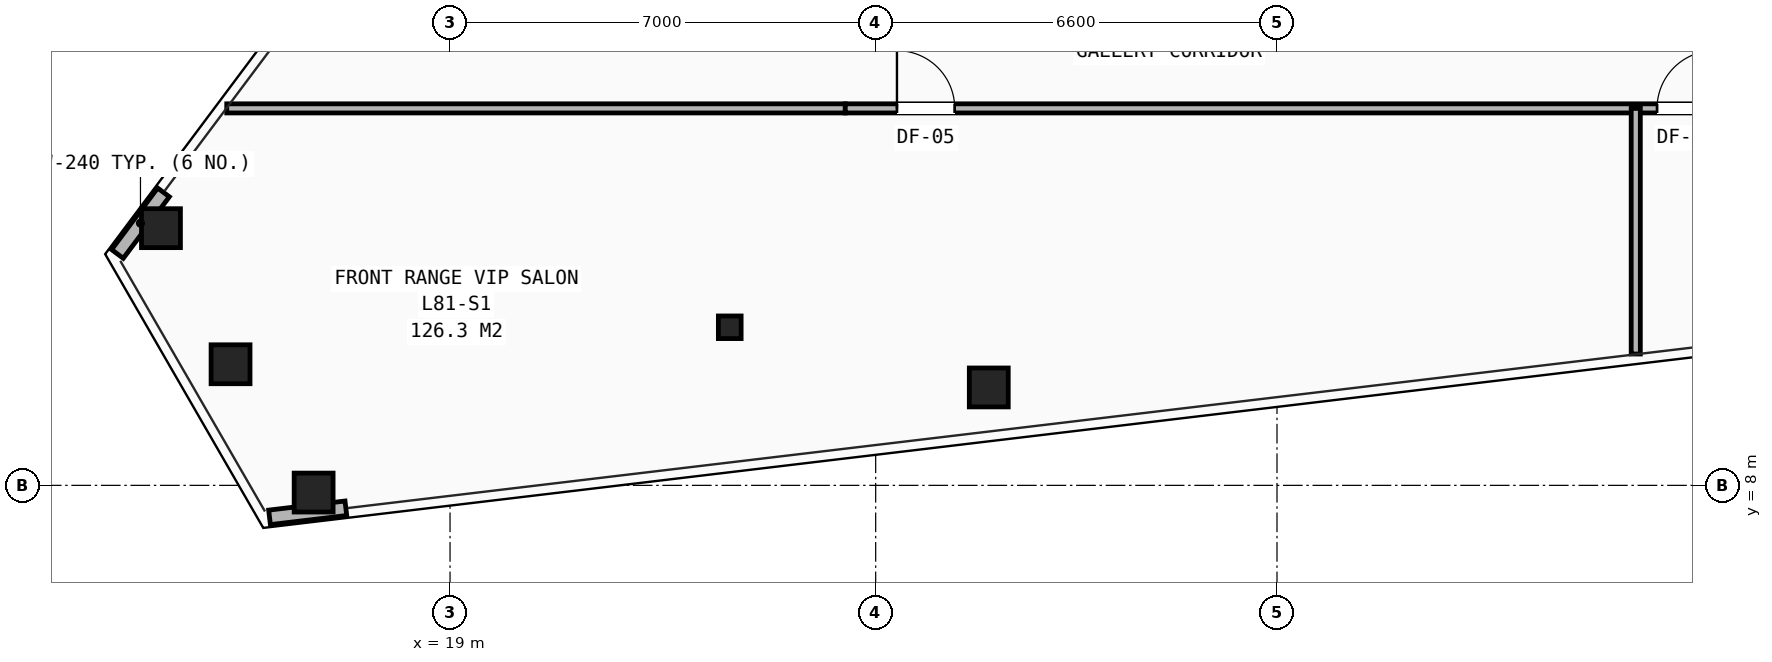
"""IFC4 building model, lengths in metres.
Left out: names, types, materials, properties, quantities, classifications, styles, units other than length and angle.
Written with IfcOpenShell. Run it as: python <this file> out.ifc"""

import sys

from ifc_helpers import new_model, si_unit, direction, frame, frame_2d, origin, origin_2d, place, context, subcontext, project, spatial, rectangle, hollow_rectangle, i_section, extrude, element, fill, save


model = new_model("IFC4")
c1 = context("Model", 3, precision=1e-05, world=origin(), true_north=direction((0.0, 1.0)))
c2 = subcontext(c1, "Body", "Model", "MODEL_VIEW")
j1 = project(units=[si_unit("LENGTHUNIT", "METRE"), si_unit("PLANEANGLEUNIT", "RADIAN")], contexts=[c1])
p1 = place(None, origin())
s1 = spatial("IfcSite", under=j1, at=p1, CompositionType="ELEMENT")
p2 = place(p1, origin())
s2 = spatial("IfcBuilding", under=s1, at=p2, CompositionType="ELEMENT")
p3 = place(p2, frame((0.0, 0.0, 286.5)))
s3 = spatial("IfcBuildingStorey", under=s2, at=p3, CompositionType="ELEMENT", Elevation=286.5)
p4 = place(p3, frame((23.6, 10.6, 0.0), z_axis=(0.0, 0.0, 1.0), x_axis=(1.0, 0.0, 0.0)))
e1 = element("IfcColumn", 1, at=p4, inside=s3, PredefinedType="COLUMN", context=c2, shape_type="SweptSolid", body=[
    extrude(i_section(OverallWidth=0.374, OverallDepth=0.372, WebThickness=0.016, FlangeThickness=0.026, at=origin_2d()), origin(), (0.0, 0.0, 1.0), 3.5),
])
for number, where, z_axis, x_axis in (
    (2, (14.246, 12.23, 0.0), (0.0, 0.0, 1.0), (1.0, 0.0, 0.0)),
    (3, (15.39, 9.992, 0.0), (0.0, 0.0, 1.0), (1.0, 0.0, 0.0)),
    (4, (16.757, 7.882, 0.0), (0.0, 0.0, 1.0), (1.0, 0.0, 0.0)),
    (5, (27.86, 9.61, 0.0), (0.0, 0.0, 1.0), (1.0, 0.0, 0.0)),
):
    element("IfcColumn", number, at=place(p3, frame(where, z_axis=z_axis, x_axis=x_axis)), inside=s3, PredefinedType="COLUMN", context=c2, shape_type="SweptSolid", body=[
        extrude(hollow_rectangle(XDim=0.64, YDim=0.64, WallThickness=0.045, at=origin_2d()), origin(), (0.0, 0.0, 1.0), 3.5),
    ])
p5 = place(p3, frame((14.288, 12.818, 0.0), z_axis=(0.0, 0.0, 1.0), x_axis=(-0.5991037677, -0.800671390477, 0.0)))
e6 = element("IfcWall", 6, at=p5, inside=s3, PredefinedType="SHEAR", context=c2, shape_type="SweptSolid", body=[
    extrude(rectangle(XDim=1.264, YDim=0.24, at=frame_2d((0.632, 0.0))), origin(), (0.0, 0.0, 1.0), 2.573),
])
p6 = place(p3, frame((16.031, 7.473, 0.0), z_axis=(0.0, 0.0, 1.0), x_axis=(0.992948828443, 0.118543764469, 0.0)))
e7 = element("IfcWall", 7, at=p6, inside=s3, PredefinedType="SHEAR", context=c2, shape_type="SweptSolid", body=[
    extrude(rectangle(XDim=1.265, YDim=0.24, at=frame_2d((0.632, 0.0))), origin(), (0.0, 0.0, 1.0), 2.573),
])
p7 = place(p3, frame((15.328, 14.2, 0.0), z_axis=(0.0, 0.0, 1.0), x_axis=(1.0, 0.0, 0.0)))
e8 = element("IfcWall", 8, at=p7, inside=s3, PredefinedType="PARTITIONING", context=c2, shape_type="SweptSolid", body=[
    extrude(rectangle(XDim=10.172, YDim=0.15, at=frame_2d((5.086, 0.0))), origin(), (0.0, 0.0, 1.0), 2.242),
])
p8 = place(p3, frame((25.5, 14.2, 0.0), z_axis=(0.0, 0.0, 1.0), x_axis=(1.0, 0.0, 0.0)))
e9 = element("IfcWall", 9, at=p8, inside=s3, PredefinedType="PARTITIONING", context=c2, shape_type="SweptSolid", body=[
    extrude(rectangle(XDim=29.0, YDim=0.15, at=frame_2d((14.5, 0.0))), origin(), (0.0, 0.0, 1.0), 2.242),
])
p9 = place(p8, frame((0.85, 0.0, 0.0)))
e10 = element("IfcOpeningElement", 10, at=p9, cuts=e9, PredefinedType="OPENING", context=c2, shape_type="SweptSolid", body=[
    extrude(rectangle(XDim=0.95, YDim=2.1, at=frame_2d((0.475, 1.05))), frame((0.0, 0.085, 0.0), z_axis=(0.0, -1.0, 0.0), x_axis=(1.0, 0.0, 0.0)), (0.0, 0.0, 1.0), 0.17),
])
p10 = place(p8, frame((13.35, 0.0, 0.0)))
e11 = element("IfcOpeningElement", 11, at=p10, cuts=e9, PredefinedType="OPENING", context=c2, shape_type="SweptSolid", body=[
    extrude(rectangle(XDim=0.95, YDim=2.1, at=frame_2d((0.475, 1.05))), frame((0.0, 0.085, 0.0), z_axis=(0.0, -1.0, 0.0), x_axis=(1.0, 0.0, 0.0)), (0.0, 0.0, 1.0), 0.17),
])
p11 = place(p3, frame((38.5, 10.16, 0.0), z_axis=(0.0, 0.0, 1.0), x_axis=(0.0, 1.0, 0.0)))
e12 = element("IfcWall", 12, at=p11, inside=s3, PredefinedType="PARTITIONING", context=c2, shape_type="SweptSolid", body=[
    extrude(rectangle(XDim=4.04, YDim=0.15, at=frame_2d((2.02, 0.0))), origin(), (0.0, 0.0, 1.0), 2.242),
])
p12 = place(p9, origin())
e13 = element("IfcDoor", 13, at=p12, inside=s3, OperationType="SINGLE_SWING_LEFT", PredefinedType="DOOR", context=c2, shape_type="SweptSolid", body=[
    extrude(rectangle(XDim=0.95, YDim=2.1, at=frame_2d((0.475, 1.05))), frame((0.0, 0.025, 0.0), z_axis=(0.0, -1.0, 0.0), x_axis=(1.0, 0.0, 0.0)), (0.0, 0.0, 1.0), 0.05),
])
fill(e10, e13)
p13 = place(p10, origin())
e14 = element("IfcDoor", 14, at=p13, inside=s3, OperationType="SINGLE_SWING_RIGHT", PredefinedType="DOOR", context=c2, shape_type="SweptSolid", body=[
    extrude(rectangle(XDim=0.95, YDim=2.1, at=frame_2d((0.475, 1.05))), frame((0.0, 0.025, 0.0), z_axis=(0.0, -1.0, 0.0), x_axis=(1.0, 0.0, 0.0)), (0.0, 0.0, 1.0), 0.05),
])
fill(e11, e14)
save(model, sys.argv[1])
